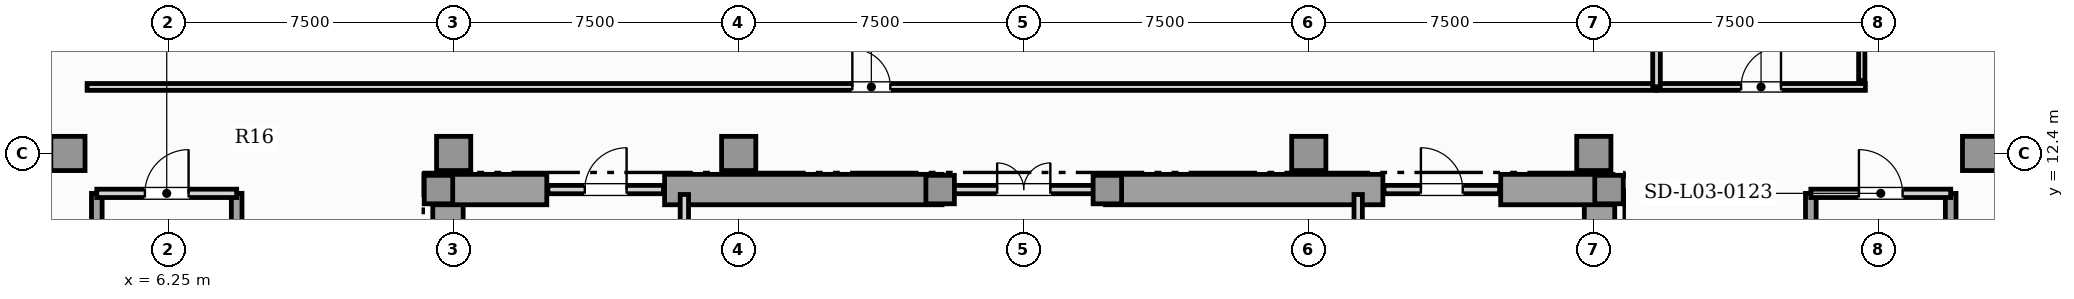
"""IFC4 building model, lengths in metres.
Left out: names, types, materials, properties, quantities, classifications, styles, units other than length and angle.
Written with IfcOpenShell. Run it as: python <this file> out.ifc"""

import sys

from ifc_helpers import new_model, si_unit, direction, frame, frame_2d, origin, origin_2d, place, context, subcontext, project, spatial, rectangle, extrude, element, fill, save


model = new_model("IFC4")
c1 = context("Model", 3, precision=1e-05, world=origin(), true_north=direction((0.0, 1.0)))
c2 = subcontext(c1, "Body", "Model", "MODEL_VIEW")
j1 = project(units=[si_unit("LENGTHUNIT", "METRE"), si_unit("PLANEANGLEUNIT", "RADIAN")], contexts=[c1])
p1 = place(None, origin())
s1 = spatial("IfcSite", under=j1, at=p1, CompositionType="ELEMENT")
p2 = place(p1, origin())
s2 = spatial("IfcBuilding", under=s1, at=p2, CompositionType="ELEMENT")
p3 = place(p2, frame((0.0, 0.0, 15.0)))
s3 = spatial("IfcBuildingStorey", under=s2, at=p3, CompositionType="ELEMENT", Elevation=15.0)
for number, where, z_axis, x_axis in (
    (1, (13.6, 0.92, 0.0), (0.0, 0.0, 1.0), (0.0, 1.0, 0.0)),
    (2, (43.9, 0.92, 0.0), (0.0, 0.0, 1.0), (0.0, 1.0, 0.0)),
):
    element("IfcWall", number, at=place(p3, frame(where, z_axis=z_axis, x_axis=x_axis)), inside=s3, PredefinedType="SHEAR", context=c2, shape_type="SweptSolid", body=[
        extrude(rectangle(XDim=10.53, YDim=0.8, at=frame_2d((5.265, 0.0))), origin(), (0.0, 0.0, 1.0), 4.5),
    ])
p4 = place(p3, frame((13.25, 11.45, 0.0), z_axis=(0.0, 0.0, 1.0), x_axis=(1.0, 0.0, 0.0)))
e3 = element("IfcWall", 3, at=p4, inside=s3, PredefinedType="SHEAR", context=c2, shape_type="SweptSolid", body=[
    extrude(rectangle(XDim=2.95, YDim=0.8, at=frame_2d((1.475, 0.0))), origin(), (0.0, 0.0, 1.0), 4.5),
])
for number, where, z_axis, x_axis in (
    (4, (19.3, 11.45, 0.0), (0.0, 0.0, 1.0), (1.0, 0.0, 0.0)),
    (5, (30.9, 11.45, 0.0), (0.0, 0.0, 1.0), (1.0, 0.0, 0.0)),
):
    element("IfcWall", number, at=place(p3, frame(where, z_axis=z_axis, x_axis=x_axis)), inside=s3, PredefinedType="SHEAR", context=c2, shape_type="SweptSolid", body=[
        extrude(rectangle(XDim=7.3, YDim=0.8, at=frame_2d((3.65, 0.0))), origin(), (0.0, 0.0, 1.0), 4.5),
    ])
p5 = place(p3, frame((41.3, 11.45, 0.0), z_axis=(0.0, 0.0, 1.0), x_axis=(1.0, 0.0, 0.0)))
e6 = element("IfcWall", 6, at=p5, inside=s3, PredefinedType="SHEAR", context=c2, shape_type="SweptSolid", body=[
    extrude(rectangle(XDim=2.95, YDim=0.8, at=frame_2d((1.475, 0.0))), origin(), (0.0, 0.0, 1.0), 4.5),
])
for number, where, z_axis, x_axis in (
    (7, (13.35, 11.45, 0.0), (0.0, 0.0, 1.0), (1.0, 0.0, 0.0)),
    (8, (44.15, 11.45, 0.0), (0.0, 0.0, 1.0), (1.0, 0.0, 0.0)),
    (9, (26.55, 11.45, 0.0), (0.0, 0.0, 1.0), (1.0, 0.0, 0.0)),
    (10, (30.95, 11.45, 0.0), (0.0, 0.0, 1.0), (1.0, 0.0, 0.0)),
):
    element("IfcColumn", number, at=place(p3, frame(where, z_axis=z_axis, x_axis=x_axis)), inside=s3, PredefinedType="COLUMN", context=c2, shape_type="SweptSolid", body=[
        extrude(rectangle(XDim=0.75, YDim=0.75, at=origin_2d()), origin(), (0.0, 0.0, 1.0), 4.8),
    ])
for number, where, z_axis, x_axis in (
    (11, (3.6, 12.4, 0.0), (0.0, 0.0, 1.0), (1.0, 0.0, 0.0)),
    (12, (13.75, 12.4, 0.0), (0.0, 0.0, 1.0), (1.0, 0.0, 0.0)),
    (13, (43.75, 12.4, 0.0), (0.0, 0.0, 1.0), (1.0, 0.0, 0.0)),
    (14, (53.9, 12.4, 0.0), (0.0, 0.0, 1.0), (1.0, 0.0, 0.0)),
    (15, (21.25, 12.4, 0.0), (0.0, 0.0, 1.0), (1.0, 0.0, 0.0)),
    (16, (36.25, 12.4, 0.0), (0.0, 0.0, 1.0), (1.0, 0.0, 0.0)),
):
    element("IfcColumn", number, at=place(p3, frame(where, z_axis=z_axis, x_axis=x_axis)), inside=s3, PredefinedType="COLUMN", context=c2, shape_type="SweptSolid", body=[
        extrude(rectangle(XDim=0.9, YDim=0.9, at=origin_2d()), origin(), (0.0, 0.0, 1.0), 4.8),
    ])
for number, where, z_axis, x_axis in (
    (17, (4.36, 3.56, 0.0), (0.0, 0.0, 1.0), (0.0, 1.0, 0.0)),
    (18, (8.04, 3.56, 0.0), (0.0, 0.0, 1.0), (0.0, 1.0, 0.0)),
):
    element("IfcWall", number, at=place(p3, frame(where, z_axis=z_axis, x_axis=x_axis)), inside=s3, PredefinedType="SHEAR", context=c2, shape_type="SweptSolid", body=[
        extrude(rectangle(XDim=7.79, YDim=0.28, at=frame_2d((3.895, 0.0))), origin(), (0.0, 0.0, 1.0), 4.5),
    ])
p6 = place(p3, frame((4.36, 11.35, 0.0), z_axis=(0.0, 0.0, 1.0), x_axis=(1.0, 0.0, 0.0)))
e19 = element("IfcWall", 19, at=p6, inside=s3, PredefinedType="SOLIDWALL", context=c2, shape_type="SweptSolid", body=[
    extrude(rectangle(XDim=3.68, YDim=0.22, at=frame_2d((1.84, 0.0))), origin(), (0.0, 0.0, 1.0), 4.5),
])
p7 = place(p6, frame((1.265, 0.0, 0.0)))
e20 = element("IfcOpeningElement", 20, at=p7, cuts=e19, PredefinedType="OPENING", context=c2, shape_type="SweptSolid", body=[
    extrude(rectangle(XDim=1.15, YDim=2.2, at=frame_2d((0.575, 1.1))), frame((0.0, 0.12, 0.0), z_axis=(0.0, -1.0, 0.0), x_axis=(1.0, 0.0, 0.0)), (0.0, 0.0, 1.0), 0.24),
])
for number, where, z_axis, x_axis in (
    (21, (49.46, 3.56, 0.0), (0.0, 0.0, 1.0), (0.0, 1.0, 0.0)),
    (22, (53.14, 3.56, 0.0), (0.0, 0.0, 1.0), (0.0, 1.0, 0.0)),
):
    element("IfcWall", number, at=place(p3, frame(where, z_axis=z_axis, x_axis=x_axis)), inside=s3, PredefinedType="SHEAR", context=c2, shape_type="SweptSolid", body=[
        extrude(rectangle(XDim=7.79, YDim=0.28, at=frame_2d((3.895, 0.0))), origin(), (0.0, 0.0, 1.0), 4.5),
    ])
p8 = place(p3, frame((49.46, 11.35, 0.0), z_axis=(0.0, 0.0, 1.0), x_axis=(1.0, 0.0, 0.0)))
e23 = element("IfcWall", 23, at=p8, inside=s3, PredefinedType="SOLIDWALL", context=c2, shape_type="SweptSolid", body=[
    extrude(rectangle(XDim=3.68, YDim=0.22, at=frame_2d((1.84, 0.0))), origin(), (0.0, 0.0, 1.0), 4.5),
])
p9 = place(p8, frame((1.265, 0.0, 0.0)))
e24 = element("IfcOpeningElement", 24, at=p9, cuts=e23, PredefinedType="OPENING", context=c2, shape_type="SweptSolid", body=[
    extrude(rectangle(XDim=1.15, YDim=2.2, at=frame_2d((0.575, 1.1))), frame((0.0, 0.12, 0.0), z_axis=(0.0, -1.0, 0.0), x_axis=(1.0, 0.0, 0.0)), (0.0, 0.0, 1.0), 0.24),
])
p10 = place(p3, frame((19.82, 8.52, 0.0), z_axis=(0.0, 0.0, 1.0), x_axis=(0.0, 1.0, 0.0)))
e25 = element("IfcWall", 25, at=p10, inside=s3, PredefinedType="SOLIDWALL", context=c2, shape_type="SweptSolid", body=[
    extrude(rectangle(XDim=2.8, YDim=0.22, at=frame_2d((1.4, 0.0))), origin(), (0.0, 0.0, 1.0), 3.956),
])
p11 = place(p10, frame((0.85, 0.0, 0.0)))
e26 = element("IfcOpeningElement", 26, at=p11, cuts=e25, PredefinedType="OPENING", context=c2, shape_type="SweptSolid", body=[
    extrude(rectangle(XDim=1.1, YDim=2.2, at=frame_2d((0.55, 1.1))), frame((0.0, 0.12, 0.0), z_axis=(0.0, -1.0, 0.0), x_axis=(1.0, 0.0, 0.0)), (0.0, 0.0, 1.0), 0.24),
])
p12 = place(p3, frame((37.55, 8.52, 0.0), z_axis=(0.0, 0.0, 1.0), x_axis=(0.0, 1.0, 0.0)))
e27 = element("IfcWall", 27, at=p12, inside=s3, PredefinedType="SOLIDWALL", context=c2, shape_type="SweptSolid", body=[
    extrude(rectangle(XDim=2.8, YDim=0.22, at=frame_2d((1.4, 0.0))), origin(), (0.0, 0.0, 1.0), 3.956),
])
p13 = place(p12, frame((0.85, 0.0, 0.0)))
e28 = element("IfcOpeningElement", 28, at=p13, cuts=e27, PredefinedType="OPENING", context=c2, shape_type="SweptSolid", body=[
    extrude(rectangle(XDim=1.1, YDim=2.2, at=frame_2d((0.55, 1.1))), frame((0.0, 0.12, 0.0), z_axis=(0.0, -1.0, 0.0), x_axis=(1.0, 0.0, 0.0)), (0.0, 0.0, 1.0), 0.24),
])
p14 = place(p3, frame((16.23, 11.45, 0.0), z_axis=(0.0, 0.0, 1.0), x_axis=(1.0, 0.0, 0.0)))
e29 = element("IfcWall", 29, at=p14, inside=s3, PredefinedType="SOLIDWALL", context=c2, shape_type="SweptSolid", body=[
    extrude(rectangle(XDim=3.04, YDim=0.22, at=frame_2d((1.52, 0.0))), origin(), (0.0, 0.0, 1.0), 4.5),
])
p15 = place(p14, frame((0.97, 0.0, 0.0)))
e30 = element("IfcOpeningElement", 30, at=p15, cuts=e29, PredefinedType="OPENING", context=c2, shape_type="SweptSolid", body=[
    extrude(rectangle(XDim=1.1, YDim=2.2, at=frame_2d((0.55, 1.1))), frame((0.0, 0.12, 0.0), z_axis=(0.0, -1.0, 0.0), x_axis=(1.0, 0.0, 0.0)), (0.0, 0.0, 1.0), 0.24),
])
p16 = place(p3, frame((26.63, 11.45, 0.0), z_axis=(0.0, 0.0, 1.0), x_axis=(1.0, 0.0, 0.0)))
e31 = element("IfcWall", 31, at=p16, inside=s3, PredefinedType="SOLIDWALL", context=c2, shape_type="SweptSolid", body=[
    extrude(rectangle(XDim=4.24, YDim=0.22, at=frame_2d((2.12, 0.0))), origin(), (0.0, 0.0, 1.0), 4.5),
])
p17 = place(p16, frame((1.42, 0.0, 0.0)))
e32 = element("IfcOpeningElement", 32, at=p17, cuts=e31, PredefinedType="OPENING", context=c2, shape_type="SweptSolid", body=[
    extrude(rectangle(XDim=1.4, YDim=2.2, at=frame_2d((0.7, 1.1))), frame((0.0, 0.12, 0.0), z_axis=(0.0, -1.0, 0.0), x_axis=(1.0, 0.0, 0.0)), (0.0, 0.0, 1.0), 0.24),
])
p18 = place(p3, frame((38.23, 11.45, 0.0), z_axis=(0.0, 0.0, 1.0), x_axis=(1.0, 0.0, 0.0)))
e33 = element("IfcWall", 33, at=p18, inside=s3, PredefinedType="SOLIDWALL", context=c2, shape_type="SweptSolid", body=[
    extrude(rectangle(XDim=3.04, YDim=0.22, at=frame_2d((1.52, 0.0))), origin(), (0.0, 0.0, 1.0), 4.5),
])
p19 = place(p18, frame((0.97, 0.0, 0.0)))
e34 = element("IfcOpeningElement", 34, at=p19, cuts=e33, PredefinedType="OPENING", context=c2, shape_type="SweptSolid", body=[
    extrude(rectangle(XDim=1.1, YDim=2.2, at=frame_2d((0.55, 1.1))), frame((0.0, 0.12, 0.0), z_axis=(0.0, -1.0, 0.0), x_axis=(1.0, 0.0, 0.0)), (0.0, 0.0, 1.0), 0.24),
])
p20 = place(p3, frame((45.405, 14.15, 0.0), z_axis=(0.0, 0.0, 1.0), x_axis=(1.0, 0.0, 0.0)))
e35 = element("IfcWall", 35, at=p20, inside=s3, PredefinedType="PARTITIONING", context=c2, shape_type="SweptSolid", body=[
    extrude(rectangle(XDim=5.49, YDim=0.18, at=frame_2d((2.745, 0.0))), origin(), (0.0, 0.0, 1.0), 4.5),
])
p21 = place(p20, frame((2.22, 0.0, 0.0)))
e36 = element("IfcOpeningElement", 36, at=p21, cuts=e35, PredefinedType="OPENING", context=c2, shape_type="SweptSolid", body=[
    extrude(rectangle(XDim=1.05, YDim=2.15, at=frame_2d((0.525, 1.075))), frame((0.0, 0.1, 0.0), z_axis=(0.0, -1.0, 0.0), x_axis=(1.0, 0.0, 0.0)), (0.0, 0.0, 1.0), 0.2),
])
p22 = place(p3, frame((4.105, 14.15, 0.0), z_axis=(0.0, 0.0, 1.0), x_axis=(1.0, 0.0, 0.0)))
e37 = element("IfcWall", 37, at=p22, inside=s3, PredefinedType="PARTITIONING", context=c2, shape_type="SweptSolid", body=[
    extrude(rectangle(XDim=41.27, YDim=0.18, at=frame_2d((20.635, 0.0))), origin(), (0.0, 0.0, 1.0), 4.5),
])
p23 = place(p22, frame((20.135, 0.0, 0.0)))
e38 = element("IfcOpeningElement", 38, at=p23, cuts=e37, PredefinedType="OPENING", context=c2, shape_type="SweptSolid", body=[
    extrude(rectangle(XDim=1.0, YDim=2.15, at=frame_2d((0.5, 1.075))), frame((0.0, 0.1, 0.0), z_axis=(0.0, -1.0, 0.0), x_axis=(1.0, 0.0, 0.0)), (0.0, 0.0, 1.0), 0.2),
])
p24 = place(p3, frame((45.4, 14.155, 0.0), z_axis=(0.0, 0.0, 1.0), x_axis=(0.0, 1.0, 0.0)))
e39 = element("IfcWall", 39, at=p24, inside=s3, PredefinedType="PARTITIONING", context=c2, shape_type="SweptSolid", body=[
    extrude(rectangle(XDim=3.54, YDim=0.2, at=frame_2d((1.77, 0.0))), origin(), (0.0, 0.0, 1.0), 4.5),
])
p25 = place(p3, frame((50.8, 14.315, 0.0), z_axis=(0.0, 0.0, 1.0), x_axis=(0.0, 1.0, 0.0)))
e40 = element("IfcWall", 40, at=p25, inside=s3, PredefinedType="PLUMBINGWALL", context=c2, shape_type="SweptSolid", body=[
    extrude(rectangle(XDim=3.38, YDim=0.165, at=frame_2d((1.69, 0.0))), origin(), (0.0, 0.0, 1.0), 4.5),
])
p26 = place(p7, origin())
e41 = element("IfcDoor", 41, at=p26, inside=s3, OperationType="SINGLE_SWING_RIGHT", PredefinedType="DOOR", context=c2, shape_type="SweptSolid", body=[
    extrude(rectangle(XDim=1.15, YDim=2.2, at=frame_2d((0.575, 1.1))), frame((0.0, 0.025, 0.0), z_axis=(0.0, -1.0, 0.0), x_axis=(1.0, 0.0, 0.0)), (0.0, 0.0, 1.0), 0.05),
])
fill(e20, e41)
p27 = place(p9, origin())
e42 = element("IfcDoor", 42, at=p27, inside=s3, OperationType="SINGLE_SWING_LEFT", PredefinedType="DOOR", context=c2, shape_type="SweptSolid", body=[
    extrude(rectangle(XDim=1.15, YDim=2.2, at=frame_2d((0.575, 1.1))), frame((0.0, 0.025, 0.0), z_axis=(0.0, -1.0, 0.0), x_axis=(1.0, 0.0, 0.0)), (0.0, 0.0, 1.0), 0.05),
])
fill(e24, e42)
p28 = place(p15, origin())
e43 = element("IfcDoor", 43, at=p28, inside=s3, OperationType="SINGLE_SWING_RIGHT", PredefinedType="DOOR", context=c2, shape_type="SweptSolid", body=[
    extrude(rectangle(XDim=1.1, YDim=2.2, at=frame_2d((0.55, 1.1))), frame((0.0, 0.025, 0.0), z_axis=(0.0, -1.0, 0.0), x_axis=(1.0, 0.0, 0.0)), (0.0, 0.0, 1.0), 0.05),
])
fill(e30, e43)
p29 = place(p17, origin())
e44 = element("IfcDoor", 44, at=p29, inside=s3, OperationType="DOUBLE_DOOR_SINGLE_SWING", PredefinedType="DOOR", context=c2, shape_type="SweptSolid", body=[
    extrude(rectangle(XDim=1.4, YDim=2.2, at=frame_2d((0.7, 1.1))), frame((0.0, 0.025, 0.0), z_axis=(0.0, -1.0, 0.0), x_axis=(1.0, 0.0, 0.0)), (0.0, 0.0, 1.0), 0.05),
])
fill(e32, e44)
p30 = place(p19, origin())
e45 = element("IfcDoor", 45, at=p30, inside=s3, OperationType="SINGLE_SWING_LEFT", PredefinedType="DOOR", context=c2, shape_type="SweptSolid", body=[
    extrude(rectangle(XDim=1.1, YDim=2.2, at=frame_2d((0.55, 1.1))), frame((0.0, 0.025, 0.0), z_axis=(0.0, -1.0, 0.0), x_axis=(1.0, 0.0, 0.0)), (0.0, 0.0, 1.0), 0.05),
])
fill(e34, e45)
p31 = place(p21, origin())
e46 = element("IfcDoor", 46, at=p31, inside=s3, OperationType="SINGLE_SWING_RIGHT", PredefinedType="DOOR", context=c2, shape_type="SweptSolid", body=[
    extrude(rectangle(XDim=1.05, YDim=2.15, at=frame_2d((0.525, 1.075))), frame((0.0, 0.025, 0.0), z_axis=(0.0, -1.0, 0.0), x_axis=(1.0, 0.0, 0.0)), (0.0, 0.0, 1.0), 0.05),
])
fill(e36, e46)
p32 = place(p23, origin())
e47 = element("IfcDoor", 47, at=p32, inside=s3, OperationType="SINGLE_SWING_LEFT", PredefinedType="DOOR", context=c2, shape_type="SweptSolid", body=[
    extrude(rectangle(XDim=1.0, YDim=2.15, at=frame_2d((0.5, 1.075))), frame((0.0, 0.025, 0.0), z_axis=(0.0, -1.0, 0.0), x_axis=(1.0, 0.0, 0.0)), (0.0, 0.0, 1.0), 0.05),
])
fill(e38, e47)
save(model, sys.argv[1])
